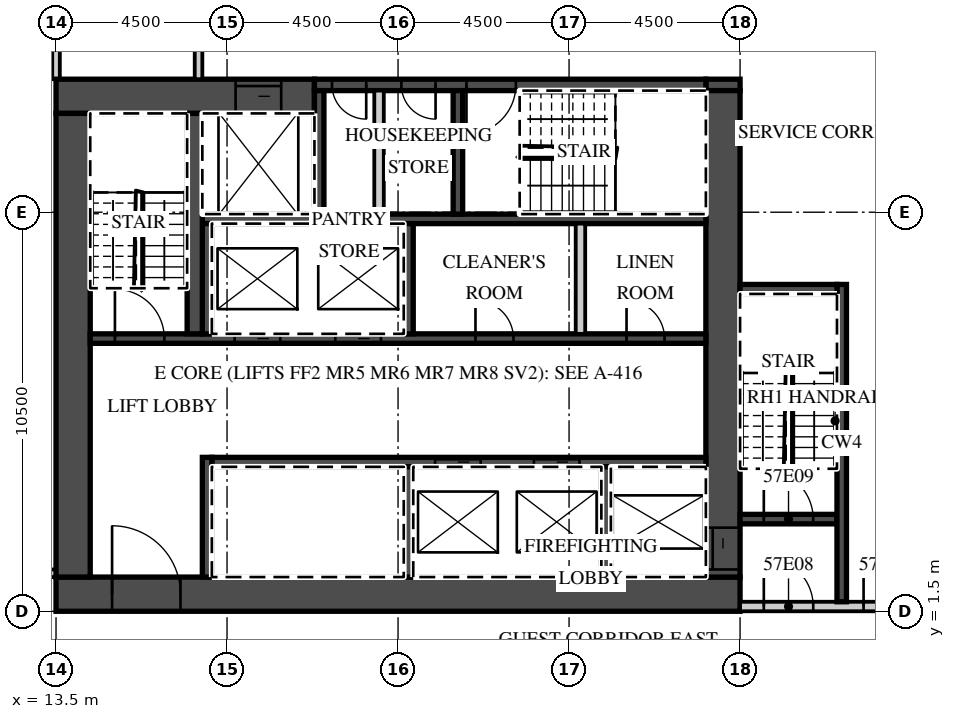
"""IFC4 building model, lengths in metres.
Left out: names, types, materials, properties, quantities, classifications, styles, units other than length and angle.
Written with IfcOpenShell. Run it as: python <this file> out.ifc"""

import sys

from ifc_helpers import new_model, si_unit, direction, frame, frame_2d, origin, place, context, subcontext, project, spatial, rectangle, extrude, element, fill, save


model = new_model("IFC4")
c1 = context("Model", 3, precision=1e-05, world=origin(), true_north=direction((0.0, 1.0)))
c2 = subcontext(c1, "Body", "Model", "MODEL_VIEW")
j1 = project(units=[si_unit("LENGTHUNIT", "METRE"), si_unit("PLANEANGLEUNIT", "RADIAN")], contexts=[c1])
p1 = place(None, origin())
s1 = spatial("IfcSite", under=j1, at=p1, CompositionType="ELEMENT")
p2 = place(p1, origin())
s2 = spatial("IfcBuilding", under=s1, at=p2, CompositionType="ELEMENT")
p3 = place(p2, frame((0.0, 0.0, 234.2)))
s3 = spatial("IfcBuildingStorey", under=s2, at=p3, CompositionType="ELEMENT", Elevation=234.2)
p4 = place(p3, frame((13.5, 15.5, 0.0), z_axis=(0.0, 0.0, 1.0), x_axis=(0.0, 1.0, 0.0)))
e1 = element("IfcWall", 1, at=p4, inside=s3, PredefinedType="PARTITIONING", context=c2, shape_type="SweptSolid", body=[
    extrude(rectangle(XDim=5.436, YDim=0.2, at=frame_2d((2.718, 0.0))), origin(), (0.0, 0.0, 1.0), 3.02),
])
p5 = place(p3, frame((-13.5, 2.5, 0.0), z_axis=(0.0, 0.0, 1.0), x_axis=(1.0, 0.0, 0.0)))
e2 = element("IfcWall", 2, at=p5, inside=s3, PredefinedType="PARTITIONING", context=c2, shape_type="SweptSolid", body=[
    extrude(rectangle(XDim=27.0, YDim=0.2, at=frame_2d((13.5, 0.0))), origin(), (0.0, 0.0, 1.0), 3.02),
])
p6 = place(p5, frame((2.925, 0.0, 0.0)))
e3 = element("IfcOpeningElement", 3, at=p6, cuts=e2, PredefinedType="OPENING", context=c2, shape_type="SweptSolid", body=[
    extrude(rectangle(XDim=1.0, YDim=2.1, at=frame_2d((0.5, 1.05))), frame((0.0, 0.11, 0.0), z_axis=(0.0, -1.0, 0.0), x_axis=(1.0, 0.0, 0.0)), (0.0, 0.0, 1.0), 0.22),
])
p7 = place(p5, frame((6.938, 0.0, 0.0)))
e4 = element("IfcOpeningElement", 4, at=p7, cuts=e2, PredefinedType="OPENING", context=c2, shape_type="SweptSolid", body=[
    extrude(rectangle(XDim=1.2, YDim=2.1, at=frame_2d((0.6, 1.05))), frame((0.0, 0.11, 0.0), z_axis=(0.0, -1.0, 0.0), x_axis=(1.0, 0.0, 0.0)), (0.0, 0.0, 1.0), 0.22),
])
p8 = place(p5, frame((14.075, 0.0, 0.0)))
e5 = element("IfcOpeningElement", 5, at=p8, cuts=e2, PredefinedType="OPENING", context=c2, shape_type="SweptSolid", body=[
    extrude(rectangle(XDim=1.0, YDim=2.1, at=frame_2d((0.5, 1.05))), frame((0.0, 0.11, 0.0), z_axis=(0.0, -1.0, 0.0), x_axis=(1.0, 0.0, 0.0)), (0.0, 0.0, 1.0), 0.22),
])
p9 = place(p5, frame((20.925, 0.0, 0.0)))
e6 = element("IfcOpeningElement", 6, at=p9, cuts=e2, PredefinedType="OPENING", context=c2, shape_type="SweptSolid", body=[
    extrude(rectangle(XDim=1.0, YDim=2.1, at=frame_2d((0.5, 1.05))), frame((0.0, 0.11, 0.0), z_axis=(0.0, -1.0, 0.0), x_axis=(1.0, 0.0, 0.0)), (0.0, 0.0, 1.0), 0.22),
])
p10 = place(p5, frame((25.425, 0.0, 0.0)))
e7 = element("IfcOpeningElement", 7, at=p10, cuts=e2, PredefinedType="OPENING", context=c2, shape_type="SweptSolid", body=[
    extrude(rectangle(XDim=1.0, YDim=2.1, at=frame_2d((0.5, 1.05))), frame((0.0, 0.11, 0.0), z_axis=(0.0, -1.0, 0.0), x_axis=(1.0, 0.0, 0.0)), (0.0, 0.0, 1.0), 0.22),
])
p11 = place(p3, frame((13.5, 1.95, 0.0), z_axis=(0.0, 0.0, 1.0), x_axis=(1.0, 0.0, 0.0)))
e8 = element("IfcWall", 8, at=p11, inside=s3, PredefinedType="SHEAR", context=c2, shape_type="SweptSolid", body=[
    extrude(rectangle(XDim=18.0, YDim=0.9, at=frame_2d((9.0, 0.0))), origin(), (0.0, 0.0, 1.0), 3.02),
])
p12 = place(p11, frame((1.475, 0.0, 0.0)))
e9 = element("IfcOpeningElement", 9, at=p12, cuts=e8, PredefinedType="OPENING", context=c2, shape_type="SweptSolid", body=[
    extrude(rectangle(XDim=1.8, YDim=2.1, at=frame_2d((0.9, 1.05))), frame((0.0, 0.46, 0.0), z_axis=(0.0, -1.0, 0.0), x_axis=(1.0, 0.0, 0.0)), (0.0, 0.0, 1.0), 0.92),
])
p13 = place(p3, frame((13.5, 15.05, 0.0), z_axis=(0.0, 0.0, 1.0), x_axis=(1.0, 0.0, 0.0)))
e10 = element("IfcWall", 10, at=p13, inside=s3, PredefinedType="SHEAR", context=c2, shape_type="SweptSolid", body=[
    extrude(rectangle(XDim=6.8, YDim=0.9, at=frame_2d((3.4, 0.0))), origin(), (0.0, 0.0, 1.0), 3.02),
])
p14 = place(p13, frame((4.725, 0.0, 0.0)))
e11 = element("IfcOpeningElement", 11, at=p14, cuts=e10, PredefinedType="OPENING", context=c2, shape_type="SweptSolid", body=[
    extrude(rectangle(XDim=1.2, YDim=2.1, at=frame_2d((0.6, 1.05))), frame((0.0, 0.46, 0.0), z_axis=(0.0, -1.0, 0.0), x_axis=(1.0, 0.0, 0.0)), (0.0, 0.0, 1.0), 0.92),
])
p15 = place(p3, frame((30.6, 15.35, 0.0), z_axis=(0.0, 0.0, 1.0), x_axis=(1.0, 0.0, 0.0)))
e12 = element("IfcWall", 12, at=p15, inside=s3, PredefinedType="SHEAR", context=c2, shape_type="SweptSolid", body=[
    extrude(rectangle(XDim=0.9, YDim=0.3, at=frame_2d((0.45, 0.0))), origin(), (0.0, 0.0, 1.0), 3.02),
])
p16 = place(p3, frame((20.3, 15.35, 0.0), z_axis=(0.0, 0.0, 1.0), x_axis=(1.0, 0.0, 0.0)))
e13 = element("IfcWall", 13, at=p16, inside=s3, PredefinedType="SHEAR", context=c2, shape_type="SweptSolid", body=[
    extrude(rectangle(XDim=10.3, YDim=0.3, at=frame_2d((5.15, 0.0))), origin(), (0.0, 0.0, 1.0), 3.02),
])
p17 = place(p16, frame((4.0, 0.0, 0.0)))
e14 = element("IfcOpeningElement", 14, at=p17, cuts=e13, PredefinedType="OPENING", context=c2, shape_type="SweptSolid", body=[
    extrude(rectangle(XDim=1.3, YDim=2.1, at=frame_2d((0.65, 1.05))), frame((0.0, 0.16, 0.0), z_axis=(0.0, -1.0, 0.0), x_axis=(1.0, 0.0, 0.0)), (0.0, 0.0, 1.0), 0.32),
])
p18 = place(p16, frame((2.288, 0.0, 0.0)))
e15 = element("IfcOpeningElement", 15, at=p18, cuts=e13, PredefinedType="OPENING", context=c2, shape_type="SweptSolid", body=[
    extrude(rectangle(XDim=0.9, YDim=2.1, at=frame_2d((0.45, 1.05))), frame((0.0, 0.16, 0.0), z_axis=(0.0, -1.0, 0.0), x_axis=(1.0, 0.0, 0.0)), (0.0, 0.0, 1.0), 0.32),
])
p19 = place(p16, frame((0.462, 0.0, 0.0)))
e16 = element("IfcOpeningElement", 16, at=p19, cuts=e13, PredefinedType="OPENING", context=c2, shape_type="SweptSolid", body=[
    extrude(rectangle(XDim=0.9, YDim=2.1, at=frame_2d((0.45, 1.05))), frame((0.0, 0.16, 0.0), z_axis=(0.0, -1.0, 0.0), x_axis=(1.0, 0.0, 0.0)), (0.0, 0.0, 1.0), 0.32),
])
p20 = place(p3, frame((31.05, 2.4, 0.0), z_axis=(0.0, 0.0, 1.0), x_axis=(0.0, 1.0, 0.0)))
e17 = element("IfcWall", 17, at=p20, inside=s3, PredefinedType="SHEAR", context=c2, shape_type="SweptSolid", body=[
    extrude(rectangle(XDim=12.8, YDim=0.9, at=frame_2d((6.4, 0.0))), origin(), (0.0, 0.0, 1.0), 3.02),
])
p21 = place(p20, frame((0.2, 0.0, 0.0)))
e18 = element("IfcOpeningElement", 18, at=p21, cuts=e17, PredefinedType="OPENING", context=c2, shape_type="SweptSolid", body=[
    extrude(rectangle(XDim=1.1, YDim=2.1, at=frame_2d((0.55, 1.05))), frame((0.0, 0.46, 0.0), z_axis=(0.0, -1.0, 0.0), x_axis=(1.0, 0.0, 0.0)), (0.0, 0.0, 1.0), 0.92),
])
p22 = place(p3, frame((13.95, 2.4, 0.0), z_axis=(0.0, 0.0, 1.0), x_axis=(0.0, 1.0, 0.0)))
e19 = element("IfcWall", 19, at=p22, inside=s3, PredefinedType="SHEAR", context=c2, shape_type="SweptSolid", body=[
    extrude(rectangle(XDim=12.2, YDim=0.9, at=frame_2d((6.1, 0.0))), origin(), (0.0, 0.0, 1.0), 3.02),
])
p23 = place(p3, frame((17.6, 5.425, 0.0), z_axis=(0.0, 0.0, 1.0), x_axis=(1.0, 0.0, 0.0)))
e20 = element("IfcWall", 20, at=p23, inside=s3, PredefinedType="SHEAR", context=c2, shape_type="SweptSolid", body=[
    extrude(rectangle(XDim=13.0, YDim=0.25, at=frame_2d((6.5, 0.0))), origin(), (0.0, 0.0, 1.0), 3.02),
])
p24 = place(p23, frame((8.475, 0.0, 0.0)))
e21 = element("IfcOpeningElement", 21, at=p24, cuts=e20, PredefinedType="OPENING", context=c2, shape_type="SweptSolid", body=[
    extrude(rectangle(XDim=1.2, YDim=2.1, at=frame_2d((0.6, 1.05))), frame((0.0, 0.135, 0.0), z_axis=(0.0, -1.0, 0.0), x_axis=(1.0, 0.0, 0.0)), (0.0, 0.0, 1.0), 0.27),
])
p25 = place(p23, frame((5.875, 0.0, 0.0)))
e22 = element("IfcOpeningElement", 22, at=p25, cuts=e20, PredefinedType="OPENING", context=c2, shape_type="SweptSolid", body=[
    extrude(rectangle(XDim=1.2, YDim=2.1, at=frame_2d((0.6, 1.05))), frame((0.0, 0.135, 0.0), z_axis=(0.0, -1.0, 0.0), x_axis=(1.0, 0.0, 0.0)), (0.0, 0.0, 1.0), 0.27),
])
p26 = place(p3, frame((17.475, 2.4, 0.0), z_axis=(0.0, 0.0, 1.0), x_axis=(0.0, 1.0, 0.0)))
e23 = element("IfcWall", 23, at=p26, inside=s3, PredefinedType="SHEAR", context=c2, shape_type="SweptSolid", body=[
    extrude(rectangle(XDim=3.15, YDim=0.25, at=frame_2d((1.575, 0.0))), origin(), (0.0, 0.0, 1.0), 3.02),
])
for number, where, z_axis, x_axis in (
    (24, (27.975, 2.4, 0.0), (0.0, 0.0, 1.0), (0.0, 1.0, 0.0)),
    (25, (22.775, 2.4, 0.0), (0.0, 0.0, 1.0), (0.0, 1.0, 0.0)),
):
    element("IfcWall", number, at=place(p3, frame(where, z_axis=z_axis, x_axis=x_axis)), inside=s3, PredefinedType="SHEAR", context=c2, shape_type="SweptSolid", body=[
        extrude(rectangle(XDim=2.9, YDim=0.25, at=frame_2d((1.45, 0.0))), origin(), (0.0, 0.0, 1.0), 3.02),
    ])
p27 = place(p3, frame((14.4, 8.675, 0.0), z_axis=(0.0, 0.0, 1.0), x_axis=(1.0, 0.0, 0.0)))
e26 = element("IfcWall", 26, at=p27, inside=s3, PredefinedType="SHEAR", context=c2, shape_type="SweptSolid", body=[
    extrude(rectangle(XDim=16.2, YDim=0.25, at=frame_2d((8.1, 0.0))), origin(), (0.0, 0.0, 1.0), 3.02),
])
p28 = place(p27, frame((6.45, 0.0, 0.0)))
e27 = element("IfcOpeningElement", 27, at=p28, cuts=e26, PredefinedType="OPENING", context=c2, shape_type="SweptSolid", body=[
    extrude(rectangle(XDim=1.2, YDim=2.1, at=frame_2d((0.6, 1.05))), frame((0.0, 0.135, 0.0), z_axis=(0.0, -1.0, 0.0), x_axis=(1.0, 0.0, 0.0)), (0.0, 0.0, 1.0), 0.27),
])
p29 = place(p27, frame((3.8, 0.0, 0.0)))
e28 = element("IfcOpeningElement", 28, at=p29, cuts=e26, PredefinedType="OPENING", context=c2, shape_type="SweptSolid", body=[
    extrude(rectangle(XDim=1.2, YDim=2.1, at=frame_2d((0.6, 1.05))), frame((0.0, 0.135, 0.0), z_axis=(0.0, -1.0, 0.0), x_axis=(1.0, 0.0, 0.0)), (0.0, 0.0, 1.0), 0.27),
])
p30 = place(p27, frame((0.65, 0.0, 0.0)))
e29 = element("IfcOpeningElement", 29, at=p30, cuts=e26, PredefinedType="OPENING", context=c2, shape_type="SweptSolid", body=[
    extrude(rectangle(XDim=1.3, YDim=2.1, at=frame_2d((0.65, 1.05))), frame((0.0, 0.135, 0.0), z_axis=(0.0, -1.0, 0.0), x_axis=(1.0, 0.0, 0.0)), (0.0, 0.0, 1.0), 0.27),
])
p31 = place(p27, frame((14.113, 0.0, 0.0)))
e30 = element("IfcOpeningElement", 30, at=p31, cuts=e26, PredefinedType="OPENING", context=c2, shape_type="SweptSolid", body=[
    extrude(rectangle(XDim=1.0, YDim=2.1, at=frame_2d((0.5, 1.05))), frame((0.0, 0.135, 0.0), z_axis=(0.0, -1.0, 0.0), x_axis=(1.0, 0.0, 0.0)), (0.0, 0.0, 1.0), 0.27),
])
p32 = place(p27, frame((10.137, 0.0, 0.0)))
e31 = element("IfcOpeningElement", 31, at=p32, cuts=e26, PredefinedType="OPENING", context=c2, shape_type="SweptSolid", body=[
    extrude(rectangle(XDim=1.0, YDim=2.1, at=frame_2d((0.5, 1.05))), frame((0.0, 0.135, 0.0), z_axis=(0.0, -1.0, 0.0), x_axis=(1.0, 0.0, 0.0)), (0.0, 0.0, 1.0), 0.27),
])
p33 = place(p3, frame((17.35, 11.825, 0.0), z_axis=(0.0, 0.0, 1.0), x_axis=(1.0, 0.0, 0.0)))
e32 = element("IfcWall", 32, at=p33, inside=s3, PredefinedType="SHEAR", context=c2, shape_type="SweptSolid", body=[
    extrude(rectangle(XDim=13.25, YDim=0.25, at=frame_2d((6.625, 0.0))), origin(), (0.0, 0.0, 1.0), 3.02),
])
for number, where, z_axis, x_axis in (
    (33, (17.475, 8.8, 0.0), (0.0, 0.0, 1.0), (0.0, 1.0, 0.0)),
    (34, (22.775, 8.8, 0.0), (0.0, 0.0, 1.0), (0.0, 1.0, 0.0)),
):
    element("IfcWall", number, at=place(p3, frame(where, z_axis=z_axis, x_axis=x_axis)), inside=s3, PredefinedType="SHEAR", context=c2, shape_type="SweptSolid", body=[
        extrude(rectangle(XDim=2.9, YDim=0.25, at=frame_2d((1.45, 0.0))), origin(), (0.0, 0.0, 1.0), 3.02),
    ])
p34 = place(p3, frame((27.3, 8.8, 0.0), z_axis=(0.0, 0.0, 1.0), x_axis=(0.0, 1.0, 0.0)))
e35 = element("IfcWall", 35, at=p34, inside=s3, PredefinedType="PARTITIONING", context=c2, shape_type="SweptSolid", body=[
    extrude(rectangle(XDim=2.9, YDim=0.25, at=frame_2d((1.45, 0.0))), origin(), (0.0, 0.0, 1.0), 3.02),
])
p35 = place(p3, frame((17.15, 8.8, 0.0), z_axis=(0.0, 0.0, 1.0), x_axis=(0.0, 1.0, 0.0)))
e36 = element("IfcWall", 36, at=p35, inside=s3, PredefinedType="SHEAR", context=c2, shape_type="SweptSolid", body=[
    extrude(rectangle(XDim=5.8, YDim=0.4, at=frame_2d((2.9, 0.0))), origin(), (0.0, 0.0, 1.0), 3.02),
])
for number, where, z_axis, x_axis in (
    (37, (20.425, 11.95, 0.0), (0.0, 0.0, 1.0), (0.0, 1.0, 0.0)),
    (38, (24.075, 11.95, 0.0), (0.0, 0.0, 1.0), (0.0, 1.0, 0.0)),
):
    element("IfcWall", number, at=place(p3, frame(where, z_axis=z_axis, x_axis=x_axis)), inside=s3, PredefinedType="SHEAR", context=c2, shape_type="SweptSolid", body=[
        extrude(rectangle(XDim=3.25, YDim=0.25, at=frame_2d((1.625, 0.0))), origin(), (0.0, 0.0, 1.0), 3.02),
    ])
p36 = place(p3, frame((22.0, 11.95, 0.0), z_axis=(0.0, 0.0, 1.0), x_axis=(0.0, 1.0, 0.0)))
e39 = element("IfcWall", 39, at=p36, inside=s3, PredefinedType="PARTITIONING", context=c2, shape_type="SweptSolid", body=[
    extrude(rectangle(XDim=3.25, YDim=0.25, at=frame_2d((1.625, 0.0))), origin(), (0.0, 0.0, 1.0), 3.02),
])
p37 = place(p3, frame((31.5, 1.625, 0.0), z_axis=(0.0, 0.0, 1.0), x_axis=(1.0, 0.0, 0.0)))
e40 = element("IfcWall", 40, at=p37, inside=s3, PredefinedType="PARTITIONING", context=c2, shape_type="SweptSolid", body=[
    extrude(rectangle(XDim=11.04, YDim=0.25, at=frame_2d((5.52, 0.0))), origin(), (0.0, 0.0, 1.0), 3.02),
])
p38 = place(p37, frame((0.625, 0.0, 0.0)))
e41 = element("IfcOpeningElement", 41, at=p38, cuts=e40, PredefinedType="OPENING", context=c2, shape_type="SweptSolid", body=[
    extrude(rectangle(XDim=1.3, YDim=2.1, at=frame_2d((0.65, 1.05))), frame((0.0, 0.135, 0.0), z_axis=(0.0, -1.0, 0.0), x_axis=(1.0, 0.0, 0.0)), (0.0, 0.0, 1.0), 0.27),
])
p39 = place(p37, frame((3.25, 0.0, 0.0)))
e42 = element("IfcOpeningElement", 42, at=p39, cuts=e40, PredefinedType="OPENING", context=c2, shape_type="SweptSolid", body=[
    extrude(rectangle(XDim=1.1, YDim=2.1, at=frame_2d((0.55, 1.05))), frame((0.0, 0.135, 0.0), z_axis=(0.0, -1.0, 0.0), x_axis=(1.0, 0.0, 0.0)), (0.0, 0.0, 1.0), 0.27),
])
p40 = place(p3, frame((31.5, 3.925, 0.0), z_axis=(0.0, 0.0, 1.0), x_axis=(1.0, 0.0, 0.0)))
e43 = element("IfcWall", 43, at=p40, inside=s3, PredefinedType="SHEAR", context=c2, shape_type="SweptSolid", body=[
    extrude(rectangle(XDim=2.55, YDim=0.25, at=frame_2d((1.275, 0.0))), origin(), (0.0, 0.0, 1.0), 3.02),
])
p41 = place(p40, frame((0.625, 0.0, 0.0)))
e44 = element("IfcOpeningElement", 44, at=p41, cuts=e43, PredefinedType="OPENING", context=c2, shape_type="SweptSolid", body=[
    extrude(rectangle(XDim=1.3, YDim=2.1, at=frame_2d((0.65, 1.05))), frame((0.0, 0.135, 0.0), z_axis=(0.0, -1.0, 0.0), x_axis=(1.0, 0.0, 0.0)), (0.0, 0.0, 1.0), 0.27),
])
p42 = place(p3, frame((34.175, 1.75, 0.0), z_axis=(0.0, 0.0, 1.0), x_axis=(0.0, 1.0, 0.0)))
e45 = element("IfcWall", 45, at=p42, inside=s3, PredefinedType="SHEAR", context=c2, shape_type="SweptSolid", body=[
    extrude(rectangle(XDim=8.35, YDim=0.25, at=frame_2d((4.175, 0.0))), origin(), (0.0, 0.0, 1.0), 3.02),
])
p43 = place(p3, frame((31.5, 9.975, 0.0), z_axis=(0.0, 0.0, 1.0), x_axis=(1.0, 0.0, 0.0)))
e46 = element("IfcWall", 46, at=p43, inside=s3, PredefinedType="SHEAR", context=c2, shape_type="SweptSolid", body=[
    extrude(rectangle(XDim=2.55, YDim=0.25, at=frame_2d((1.275, 0.0))), origin(), (0.0, 0.0, 1.0), 3.02),
])
p44 = place(p3, frame((17.25, 15.5, 0.0), z_axis=(0.0, 0.0, 1.0), x_axis=(0.0, 1.0, 0.0)))
e47 = element("IfcWall", 47, at=p44, inside=s3, PredefinedType="PARTITIONING", context=c2, shape_type="SweptSolid", body=[
    extrude(rectangle(XDim=2.2, YDim=0.2, at=frame_2d((1.1, 0.0))), origin(), (0.0, 0.0, 1.0), 3.02),
])
p45 = place(p28, origin())
e48 = element("IfcDoor", 48, at=p45, inside=s3, OperationType="SLIDING_TO_LEFT", PredefinedType="DOOR", context=c2, shape_type="SweptSolid", body=[
    extrude(rectangle(XDim=1.2, YDim=2.1, at=frame_2d((0.6, 1.05))), frame((0.0, 0.025, 0.0), z_axis=(0.0, -1.0, 0.0), x_axis=(1.0, 0.0, 0.0)), (0.0, 0.0, 1.0), 0.05),
])
fill(e27, e48)
p46 = place(p29, origin())
e49 = element("IfcDoor", 49, at=p46, inside=s3, OperationType="SLIDING_TO_RIGHT", PredefinedType="DOOR", context=c2, shape_type="SweptSolid", body=[
    extrude(rectangle(XDim=1.2, YDim=2.1, at=frame_2d((0.6, 1.05))), frame((0.0, 0.025, 0.0), z_axis=(0.0, -1.0, 0.0), x_axis=(1.0, 0.0, 0.0)), (0.0, 0.0, 1.0), 0.05),
])
fill(e28, e49)
p47 = place(p24, origin())
e50 = element("IfcDoor", 50, at=p47, inside=s3, OperationType="SLIDING_TO_LEFT", PredefinedType="DOOR", context=c2, shape_type="SweptSolid", body=[
    extrude(rectangle(XDim=1.2, YDim=2.1, at=frame_2d((0.6, 1.05))), frame((0.0, 0.025, 0.0), z_axis=(0.0, -1.0, 0.0), x_axis=(1.0, 0.0, 0.0)), (0.0, 0.0, 1.0), 0.05),
])
fill(e21, e50)
p48 = place(p25, origin())
e51 = element("IfcDoor", 51, at=p48, inside=s3, OperationType="SLIDING_TO_RIGHT", PredefinedType="DOOR", context=c2, shape_type="SweptSolid", body=[
    extrude(rectangle(XDim=1.2, YDim=2.1, at=frame_2d((0.6, 1.05))), frame((0.0, 0.025, 0.0), z_axis=(0.0, -1.0, 0.0), x_axis=(1.0, 0.0, 0.0)), (0.0, 0.0, 1.0), 0.05),
])
fill(e22, e51)
p49 = place(p14, origin())
e52 = element("IfcDoor", 52, at=p49, inside=s3, OperationType="SLIDING_TO_LEFT", PredefinedType="DOOR", context=c2, shape_type="SweptSolid", body=[
    extrude(rectangle(XDim=1.2, YDim=2.1, at=frame_2d((0.6, 1.05))), frame((0.0, 0.025, 0.0), z_axis=(0.0, -1.0, 0.0), x_axis=(1.0, 0.0, 0.0)), (0.0, 0.0, 1.0), 0.05),
])
fill(e11, e52)
p50 = place(p21, origin())
e53 = element("IfcDoor", 53, at=p50, inside=s3, OperationType="SLIDING_TO_LEFT", PredefinedType="DOOR", context=c2, shape_type="SweptSolid", body=[
    extrude(rectangle(XDim=1.1, YDim=2.1, at=frame_2d((0.55, 1.05))), frame((0.0, 0.025, 0.0), z_axis=(0.0, -1.0, 0.0), x_axis=(1.0, 0.0, 0.0)), (0.0, 0.0, 1.0), 0.05),
])
fill(e18, e53)
p51 = place(p12, origin())
e54 = element("IfcDoor", 54, at=p51, inside=s3, OperationType="DOUBLE_DOOR_DOUBLE_SWING", PredefinedType="DOOR", context=c2, shape_type="SweptSolid", body=[
    extrude(rectangle(XDim=1.8, YDim=2.1, at=frame_2d((0.9, 1.05))), frame((0.0, 0.025, 0.0), z_axis=(0.0, -1.0, 0.0), x_axis=(1.0, 0.0, 0.0)), (0.0, 0.0, 1.0), 0.05),
])
fill(e9, e54)
p52 = place(p38, origin())
e55 = element("IfcDoor", 55, at=p52, inside=s3, OperationType="SINGLE_SWING_LEFT", PredefinedType="DOOR", context=c2, shape_type="SweptSolid", body=[
    extrude(rectangle(XDim=1.3, YDim=2.1, at=frame_2d((0.65, 1.05))), frame((0.0, 0.025, 0.0), z_axis=(0.0, -1.0, 0.0), x_axis=(1.0, 0.0, 0.0)), (0.0, 0.0, 1.0), 0.05),
])
fill(e41, e55)
p53 = place(p41, origin())
e56 = element("IfcDoor", 56, at=p53, inside=s3, OperationType="SINGLE_SWING_LEFT", PredefinedType="DOOR", context=c2, shape_type="SweptSolid", body=[
    extrude(rectangle(XDim=1.3, YDim=2.1, at=frame_2d((0.65, 1.05))), frame((0.0, 0.025, 0.0), z_axis=(0.0, -1.0, 0.0), x_axis=(1.0, 0.0, 0.0)), (0.0, 0.0, 1.0), 0.05),
])
fill(e44, e56)
p54 = place(p39, origin())
e57 = element("IfcDoor", 57, at=p54, inside=s3, OperationType="SINGLE_SWING_LEFT", PredefinedType="DOOR", context=c2, shape_type="SweptSolid", body=[
    extrude(rectangle(XDim=1.1, YDim=2.1, at=frame_2d((0.55, 1.05))), frame((0.0, 0.025, 0.0), z_axis=(0.0, -1.0, 0.0), x_axis=(1.0, 0.0, 0.0)), (0.0, 0.0, 1.0), 0.05),
])
fill(e42, e57)
p55 = place(p30, origin())
e58 = element("IfcDoor", 58, at=p55, inside=s3, OperationType="SINGLE_SWING_LEFT", PredefinedType="DOOR", context=c2, shape_type="SweptSolid", body=[
    extrude(rectangle(XDim=1.3, YDim=2.1, at=frame_2d((0.65, 1.05))), frame((0.0, 0.025, 0.0), z_axis=(0.0, -1.0, 0.0), x_axis=(1.0, 0.0, 0.0)), (0.0, 0.0, 1.0), 0.05),
])
fill(e29, e58)
p56 = place(p17, origin())
e59 = element("IfcDoor", 59, at=p56, inside=s3, OperationType="SINGLE_SWING_LEFT", PredefinedType="DOOR", context=c2, shape_type="SweptSolid", body=[
    extrude(rectangle(XDim=1.3, YDim=2.1, at=frame_2d((0.65, 1.05))), frame((0.0, 0.025, 0.0), z_axis=(0.0, -1.0, 0.0), x_axis=(1.0, 0.0, 0.0)), (0.0, 0.0, 1.0), 0.05),
])
fill(e14, e59)
p57 = place(p18, origin())
e60 = element("IfcDoor", 60, at=p57, inside=s3, OperationType="SINGLE_SWING_RIGHT", PredefinedType="DOOR", context=c2, shape_type="SweptSolid", body=[
    extrude(rectangle(XDim=0.9, YDim=2.1, at=frame_2d((0.45, 1.05))), frame((0.0, 0.025, 0.0), z_axis=(0.0, -1.0, 0.0), x_axis=(1.0, 0.0, 0.0)), (0.0, 0.0, 1.0), 0.05),
])
fill(e15, e60)
p58 = place(p19, origin())
e61 = element("IfcDoor", 61, at=p58, inside=s3, OperationType="SINGLE_SWING_RIGHT", PredefinedType="DOOR", context=c2, shape_type="SweptSolid", body=[
    extrude(rectangle(XDim=0.9, YDim=2.1, at=frame_2d((0.45, 1.05))), frame((0.0, 0.025, 0.0), z_axis=(0.0, -1.0, 0.0), x_axis=(1.0, 0.0, 0.0)), (0.0, 0.0, 1.0), 0.05),
])
fill(e16, e61)
p59 = place(p31, origin())
e62 = element("IfcDoor", 62, at=p59, inside=s3, OperationType="SINGLE_SWING_LEFT", PredefinedType="DOOR", context=c2, shape_type="SweptSolid", body=[
    extrude(rectangle(XDim=1.0, YDim=2.1, at=frame_2d((0.5, 1.05))), frame((0.0, 0.025, 0.0), z_axis=(0.0, -1.0, 0.0), x_axis=(1.0, 0.0, 0.0)), (0.0, 0.0, 1.0), 0.05),
])
fill(e30, e62)
p60 = place(p32, origin())
e63 = element("IfcDoor", 63, at=p60, inside=s3, OperationType="SINGLE_SWING_LEFT", PredefinedType="DOOR", context=c2, shape_type="SweptSolid", body=[
    extrude(rectangle(XDim=1.0, YDim=2.1, at=frame_2d((0.5, 1.05))), frame((0.0, 0.025, 0.0), z_axis=(0.0, -1.0, 0.0), x_axis=(1.0, 0.0, 0.0)), (0.0, 0.0, 1.0), 0.05),
])
fill(e31, e63)
save(model, sys.argv[1])
